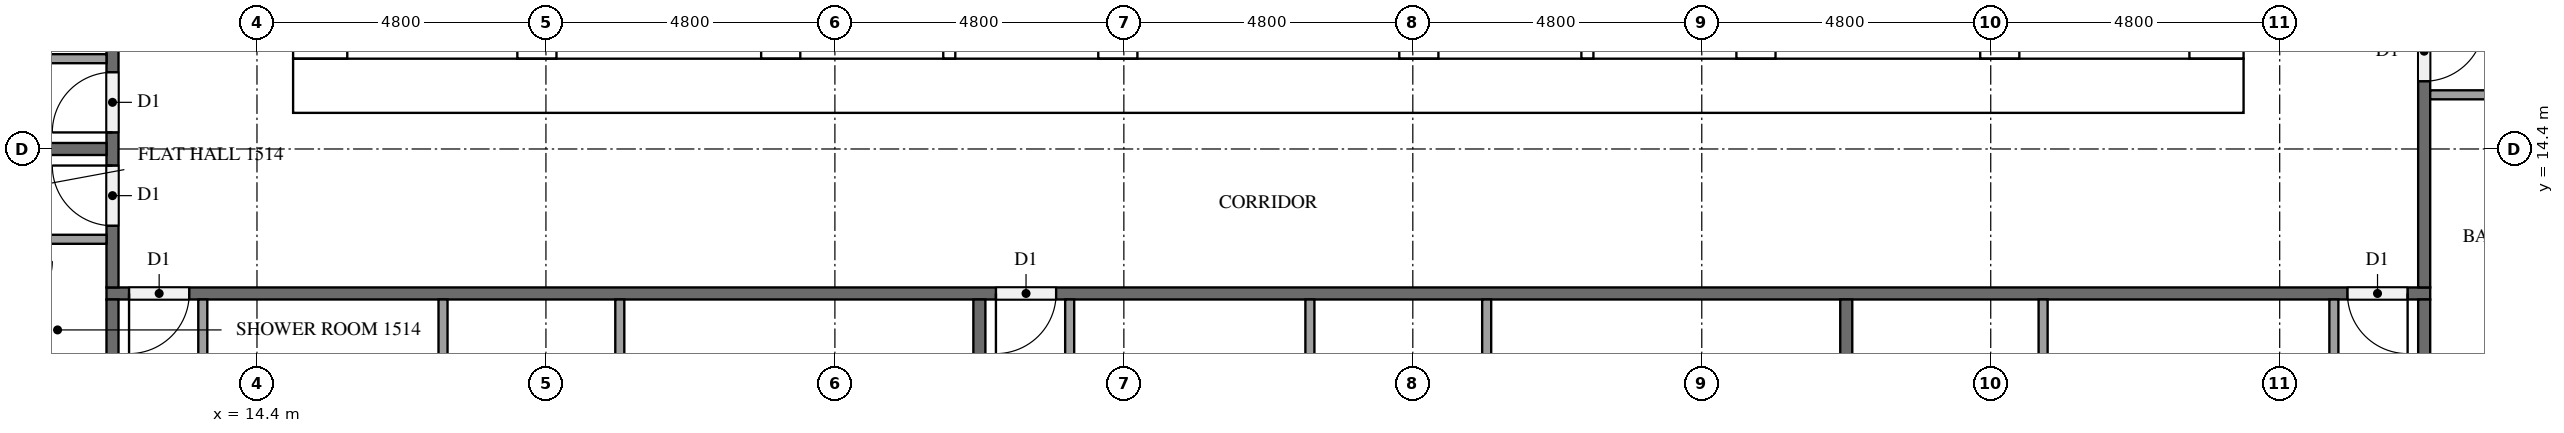
"""IFC4 building model, lengths in metres.
Left out: names, types, materials, properties, quantities, classifications, styles, units other than length and angle.
Written with IfcOpenShell. Run it as: python <this file> out.ifc"""

import sys

from ifc_helpers import new_model, si_unit, direction, frame, frame_2d, origin, place, context, subcontext, project, spatial, rectangle, extrude, element, fill, save


model = new_model("IFC4")
c1 = context("Model", 3, precision=1e-05, world=origin(), true_north=direction((0.0, 1.0)))
c2 = subcontext(c1, "Body", "Model", "MODEL_VIEW")
j1 = project(units=[si_unit("LENGTHUNIT", "METRE"), si_unit("PLANEANGLEUNIT", "RADIAN")], contexts=[c1])
p1 = place(None, origin())
s1 = spatial("IfcSite", under=j1, at=p1, CompositionType="ELEMENT")
p2 = place(p1, origin())
s2 = spatial("IfcBuilding", under=s1, at=p2, CompositionType="ELEMENT")
p3 = place(p2, frame((0.0, 0.0, 62.8)))
s3 = spatial("IfcBuildingStorey", under=s2, at=p3, CompositionType="ELEMENT", Elevation=62.8)
p4 = place(p3, frame((15.0, 15.45, 0.0), z_axis=(0.0, 0.0, 1.0), x_axis=(1.0, 0.0, 0.0)))
e1 = element("IfcWall", 1, at=p4, inside=s3, PredefinedType="SHEAR", context=c2, shape_type="SweptSolid", body=[
    extrude(rectangle(XDim=32.4, YDim=0.9, at=frame_2d((16.2, 0.0))), origin(), (0.0, 0.0, 1.0), 3.2),
])
p5 = place(p4, frame((15.3, 0.0, 0.0)))
e2 = element("IfcOpeningElement", 2, at=p5, cuts=e1, PredefinedType="OPENING", context=c2, shape_type="SweptSolid", body=[
    extrude(rectangle(XDim=1.8, YDim=2.1, at=frame_2d((0.9, 1.05))), frame((0.0, 0.46, 0.0), z_axis=(0.0, -1.0, 0.0), x_axis=(1.0, 0.0, 0.0)), (0.0, 0.0, 1.0), 0.92),
])
p6 = place(p3, frame((15.45, 15.9, 0.0), z_axis=(0.0, 0.0, 1.0), x_axis=(0.0, 1.0, 0.0)))
e3 = element("IfcWall", 3, at=p6, inside=s3, PredefinedType="SHEAR", context=c2, shape_type="SweptSolid", body=[
    extrude(rectangle(XDim=21.0, YDim=0.9, at=frame_2d((10.5, 0.0))), origin(), (0.0, 0.0, 1.0), 3.2),
])
p7 = place(p6, frame((4.86, 0.0, 0.0)))
e4 = element("IfcOpeningElement", 4, at=p7, cuts=e3, PredefinedType="OPENING", context=c2, shape_type="SweptSolid", body=[
    extrude(rectangle(XDim=1.2, YDim=2.1, at=frame_2d((0.6, 1.05))), frame((0.0, 0.46, 0.0), z_axis=(0.0, -1.0, 0.0), x_axis=(1.0, 0.0, 0.0)), (0.0, 0.0, 1.0), 0.92),
])
p8 = place(p3, frame((46.95, 15.9, 0.0), z_axis=(0.0, 0.0, 1.0), x_axis=(0.0, 1.0, 0.0)))
e5 = element("IfcWall", 5, at=p8, inside=s3, PredefinedType="SHEAR", context=c2, shape_type="SweptSolid", body=[
    extrude(rectangle(XDim=21.0, YDim=0.9, at=frame_2d((10.5, 0.0))), origin(), (0.0, 0.0, 1.0), 3.2),
])
p9 = place(p8, frame((10.2, 0.0, 0.0)))
e6 = element("IfcOpeningElement", 6, at=p9, cuts=e5, PredefinedType="OPENING", context=c2, shape_type="SweptSolid", body=[
    extrude(rectangle(XDim=1.2, YDim=2.1, at=frame_2d((0.6, 1.05))), frame((0.0, 0.46, 0.0), z_axis=(0.0, -1.0, 0.0), x_axis=(1.0, 0.0, 0.0)), (0.0, 0.0, 1.0), 0.92),
])
p10 = place(p3, frame((19.05, 15.9, 0.0), z_axis=(0.0, 0.0, 1.0), x_axis=(0.0, 1.0, 0.0)))
e7 = element("IfcWall", 7, at=p10, inside=s3, PredefinedType="SHEAR", context=c2, shape_type="SweptSolid", body=[
    extrude(rectangle(XDim=15.025, YDim=0.65, at=frame_2d((7.513, 0.0))), origin(), (0.0, 0.0, 1.0), 3.2),
])
p11 = place(p10, frame((9.55, 0.0, 0.0)))
e8 = element("IfcOpeningElement", 8, at=p11, cuts=e7, PredefinedType="OPENING", context=c2, shape_type="SweptSolid", body=[
    extrude(rectangle(XDim=1.1, YDim=2.1, at=frame_2d((0.55, 1.05))), frame((0.0, 0.335, 0.0), z_axis=(0.0, -1.0, 0.0), x_axis=(1.0, 0.0, 0.0)), (0.0, 0.0, 1.0), 0.67),
])
p12 = place(p10, frame((13.05, 0.0, 0.0)))
e9 = element("IfcOpeningElement", 9, at=p12, cuts=e7, PredefinedType="OPENING", context=c2, shape_type="SweptSolid", body=[
    extrude(rectangle(XDim=1.1, YDim=2.1, at=frame_2d((0.55, 1.05))), frame((0.0, 0.335, 0.0), z_axis=(0.0, -1.0, 0.0), x_axis=(1.0, 0.0, 0.0)), (0.0, 0.0, 1.0), 0.67),
])
p13 = place(p10, frame((0.3, 0.0, 0.0)))
e10 = element("IfcOpeningElement", 10, at=p13, cuts=e7, PredefinedType="OPENING", context=c2, shape_type="SweptSolid", body=[
    extrude(rectangle(XDim=1.2, YDim=2.1, at=frame_2d((0.6, 1.05))), frame((0.0, 0.335, 0.0), z_axis=(0.0, -1.0, 0.0), x_axis=(1.0, 0.0, 0.0)), (0.0, 0.0, 1.0), 0.67),
])
p14 = place(p3, frame((23.1, 15.9, 0.0), z_axis=(0.0, 0.0, 1.0), x_axis=(0.0, 1.0, 0.0)))
e11 = element("IfcWall", 11, at=p14, inside=s3, PredefinedType="SHEAR", context=c2, shape_type="SweptSolid", body=[
    extrude(rectangle(XDim=21.0, YDim=0.65, at=frame_2d((10.5, 0.0))), origin(), (0.0, 0.0, 1.0), 3.2),
])
p15 = place(p3, frame((39.3, 15.9, 0.0), z_axis=(0.0, 0.0, 1.0), x_axis=(0.0, 1.0, 0.0)))
e12 = element("IfcWall", 12, at=p15, inside=s3, PredefinedType="SHEAR", context=c2, shape_type="SweptSolid", body=[
    extrude(rectangle(XDim=8.35, YDim=0.65, at=frame_2d((4.175, 0.0))), origin(), (0.0, 0.0, 1.0), 3.2),
])
p16 = place(p3, frame((43.35, 15.9, 0.0), z_axis=(0.0, 0.0, 1.0), x_axis=(0.0, 1.0, 0.0)))
e13 = element("IfcWall", 13, at=p16, inside=s3, PredefinedType="SHEAR", context=c2, shape_type="SweptSolid", body=[
    extrude(rectangle(XDim=8.35, YDim=0.65, at=frame_2d((4.175, 0.0))), origin(), (0.0, 0.0, 1.0), 3.2),
])
p17 = place(p16, frame((0.3, 0.0, 0.0)))
e14 = element("IfcOpeningElement", 14, at=p17, cuts=e13, PredefinedType="OPENING", context=c2, shape_type="SweptSolid", body=[
    extrude(rectangle(XDim=1.2, YDim=2.1, at=frame_2d((0.6, 1.05))), frame((0.0, 0.335, 0.0), z_axis=(0.0, -1.0, 0.0), x_axis=(1.0, 0.0, 0.0)), (0.0, 0.0, 1.0), 0.67),
])
for number, where, z_axis, x_axis in (
    (15, (28.7, 15.9, 0.0), (0.0, 0.0, 1.0), (0.0, 1.0, 0.0)),
    (16, (33.7, 15.9, 0.0), (0.0, 0.0, 1.0), (0.0, 1.0, 0.0)),
):
    element("IfcWall", number, at=place(p3, frame(where, z_axis=z_axis, x_axis=x_axis)), inside=s3, PredefinedType="SHEAR", context=c2, shape_type="SweptSolid", body=[
        extrude(rectangle(XDim=2.525, YDim=0.65, at=frame_2d((1.263, 0.0))), origin(), (0.0, 0.0, 1.0), 3.2),
    ])
for number, where, z_axis, x_axis in (
    (17, (25.9, 15.9, 0.0), (0.0, 0.0, 1.0), (0.0, 1.0, 0.0)),
    (18, (36.5, 15.9, 0.0), (0.0, 0.0, 1.0), (0.0, 1.0, 0.0)),
):
    element("IfcWall", number, at=place(p3, frame(where, z_axis=z_axis, x_axis=x_axis)), inside=s3, PredefinedType="SOLIDWALL", context=c2, shape_type="SweptSolid", body=[
        extrude(rectangle(XDim=2.525, YDim=0.2, at=frame_2d((1.263, 0.0))), origin(), (0.0, 0.0, 1.0), 3.2),
    ])
p18 = place(p3, frame((50.5, 12.0, 0.0), z_axis=(0.0, 0.0, 1.0), x_axis=(-1.0, 0.0, 0.0)))
e19 = element("IfcWall", 19, at=p18, inside=s3, PredefinedType="PARTITIONING", context=c2, shape_type="SweptSolid", body=[
    extrude(rectangle(XDim=38.6, YDim=0.2, at=frame_2d((19.3, 0.0))), origin(), (0.0, 0.0, 1.0), 3.2),
])
p19 = place(p18, frame((37.225, 0.0, 0.0)))
e20 = element("IfcOpeningElement", 20, at=p19, cuts=e19, PredefinedType="OPENING", context=c2, shape_type="SweptSolid", body=[
    extrude(rectangle(XDim=1.0, YDim=2.1, at=frame_2d((0.5, 1.05))), frame((0.0, 0.11, 0.0), z_axis=(0.0, -1.0, 0.0), x_axis=(1.0, 0.0, 0.0)), (0.0, 0.0, 1.0), 0.22),
])
p20 = place(p18, frame((22.825, 0.0, 0.0)))
e21 = element("IfcOpeningElement", 21, at=p20, cuts=e19, PredefinedType="OPENING", context=c2, shape_type="SweptSolid", body=[
    extrude(rectangle(XDim=1.0, YDim=2.1, at=frame_2d((0.5, 1.05))), frame((0.0, 0.11, 0.0), z_axis=(0.0, -1.0, 0.0), x_axis=(1.0, 0.0, 0.0)), (0.0, 0.0, 1.0), 0.22),
])
p21 = place(p18, frame((0.375, 0.0, 0.0)))
e22 = element("IfcOpeningElement", 22, at=p21, cuts=e19, PredefinedType="OPENING", context=c2, shape_type="SweptSolid", body=[
    extrude(rectangle(XDim=1.0, YDim=2.1, at=frame_2d((0.5, 1.05))), frame((0.0, 0.11, 0.0), z_axis=(0.0, -1.0, 0.0), x_axis=(1.0, 0.0, 0.0)), (0.0, 0.0, 1.0), 0.22),
])
p22 = place(p3, frame((50.4, 40.7, 0.0), z_axis=(0.0, 0.0, 1.0), x_axis=(0.0, -1.0, 0.0)))
e23 = element("IfcWall", 23, at=p22, inside=s3, PredefinedType="PARTITIONING", context=c2, shape_type="SweptSolid", body=[
    extrude(rectangle(XDim=28.6, YDim=0.2, at=frame_2d((14.3, 0.0))), origin(), (0.0, 0.0, 1.0), 3.2),
])
p23 = place(p22, frame((24.175, 0.0, 0.0)))
e24 = element("IfcOpeningElement", 24, at=p23, cuts=e23, PredefinedType="OPENING", context=c2, shape_type="SweptSolid", body=[
    extrude(rectangle(XDim=1.0, YDim=2.1, at=frame_2d((0.5, 1.05))), frame((0.0, 0.11, 0.0), z_axis=(0.0, -1.0, 0.0), x_axis=(1.0, 0.0, 0.0)), (0.0, 0.0, 1.0), 0.22),
])
p24 = place(p22, frame((22.625, 0.0, 0.0)))
e25 = element("IfcOpeningElement", 25, at=p24, cuts=e23, PredefinedType="OPENING", context=c2, shape_type="SweptSolid", body=[
    extrude(rectangle(XDim=1.0, YDim=2.1, at=frame_2d((0.5, 1.05))), frame((0.0, 0.11, 0.0), z_axis=(0.0, -1.0, 0.0), x_axis=(1.0, 0.0, 0.0)), (0.0, 0.0, 1.0), 0.22),
])
p25 = place(p22, frame((10.625, 0.0, 0.0)))
e26 = element("IfcOpeningElement", 26, at=p25, cuts=e23, PredefinedType="OPENING", context=c2, shape_type="SweptSolid", body=[
    extrude(rectangle(XDim=1.0, YDim=2.1, at=frame_2d((0.5, 1.05))), frame((0.0, 0.11, 0.0), z_axis=(0.0, -1.0, 0.0), x_axis=(1.0, 0.0, 0.0)), (0.0, 0.0, 1.0), 0.22),
])
p26 = place(p3, frame((12.0, 12.1, 0.0), z_axis=(0.0, 0.0, 1.0), x_axis=(0.0, 1.0, 0.0)))
e27 = element("IfcWall", 27, at=p26, inside=s3, PredefinedType="PARTITIONING", context=c2, shape_type="SweptSolid", body=[
    extrude(rectangle(XDim=28.6, YDim=0.2, at=frame_2d((14.3, 0.0))), origin(), (0.0, 0.0, 1.0), 3.2),
])
p27 = place(p26, frame((19.375, 0.0, 0.0)))
e28 = element("IfcOpeningElement", 28, at=p27, cuts=e27, PredefinedType="OPENING", context=c2, shape_type="SweptSolid", body=[
    extrude(rectangle(XDim=1.0, YDim=2.1, at=frame_2d((0.5, 1.05))), frame((0.0, 0.11, 0.0), z_axis=(0.0, -1.0, 0.0), x_axis=(1.0, 0.0, 0.0)), (0.0, 0.0, 1.0), 0.22),
])
p28 = place(p26, frame((12.175, 0.0, 0.0)))
e29 = element("IfcOpeningElement", 29, at=p28, cuts=e27, PredefinedType="OPENING", context=c2, shape_type="SweptSolid", body=[
    extrude(rectangle(XDim=1.0, YDim=2.1, at=frame_2d((0.5, 1.05))), frame((0.0, 0.11, 0.0), z_axis=(0.0, -1.0, 0.0), x_axis=(1.0, 0.0, 0.0)), (0.0, 0.0, 1.0), 0.22),
])
p29 = place(p26, frame((2.575, 0.0, 0.0)))
e30 = element("IfcOpeningElement", 30, at=p29, cuts=e27, PredefinedType="OPENING", context=c2, shape_type="SweptSolid", body=[
    extrude(rectangle(XDim=1.0, YDim=2.1, at=frame_2d((0.5, 1.05))), frame((0.0, 0.11, 0.0), z_axis=(0.0, -1.0, 0.0), x_axis=(1.0, 0.0, 0.0)), (0.0, 0.0, 1.0), 0.22),
])
p30 = place(p26, frame((1.025, 0.0, 0.0)))
e31 = element("IfcOpeningElement", 31, at=p30, cuts=e27, PredefinedType="OPENING", context=c2, shape_type="SweptSolid", body=[
    extrude(rectangle(XDim=1.0, YDim=2.1, at=frame_2d((0.5, 1.05))), frame((0.0, 0.11, 0.0), z_axis=(0.0, -1.0, 0.0), x_axis=(1.0, 0.0, 0.0)), (0.0, 0.0, 1.0), 0.22),
])
for number, where, z_axis, x_axis in (
    (32, (26.4, 11.9, 0.0), (0.0, 0.0, 1.0), (0.0, -1.0, 0.0)),
    (33, (12.0, 0.1, 0.0), (0.0, 0.0, 1.0), (0.0, 1.0, 0.0)),
    (34, (40.8, 11.9, 0.0), (0.0, 0.0, 1.0), (0.0, -1.0, 0.0)),
    (35, (50.4, 11.9, 0.0), (0.0, 0.0, 1.0), (0.0, -1.0, 0.0)),
):
    element("IfcWall", number, at=place(p3, frame(where, z_axis=z_axis, x_axis=x_axis)), inside=s3, PredefinedType="PARTITIONING", context=c2, shape_type="SweptSolid", body=[
        extrude(rectangle(XDim=11.8, YDim=0.2, at=frame_2d((5.9, 0.0))), origin(), (0.0, 0.0, 1.0), 3.2),
    ])
p31 = place(p3, frame((5.225, 14.4, 0.0), z_axis=(0.0, 0.0, 1.0), x_axis=(1.0, 0.0, 0.0)))
e36 = element("IfcWall", 36, at=p31, inside=s3, PredefinedType="PARTITIONING", context=c2, shape_type="SweptSolid", body=[
    extrude(rectangle(XDim=6.675, YDim=0.2, at=frame_2d((3.337, 0.0))), origin(), (0.0, 0.0, 1.0), 3.2),
])
for number, where, z_axis, x_axis in (
    (37, (17.49, 11.9, 0.0), (0.0, 0.0, 1.0), (0.0, -1.0, 0.0)),
    (38, (20.427, 11.9, 0.0), (0.0, 0.0, 1.0), (0.0, -1.0, 0.0)),
):
    element("IfcWall", number, at=place(p3, frame(where, z_axis=z_axis, x_axis=x_axis)), inside=s3, PredefinedType="PARTITIONING", context=c2, shape_type="SweptSolid", body=[
        extrude(rectangle(XDim=4.325, YDim=0.15, at=frame_2d((2.163, 0.0))), origin(), (0.0, 0.0, 1.0), 3.2),
    ])
p32 = place(p3, frame((13.5, 11.9, 0.0), z_axis=(0.0, 0.0, 1.0), x_axis=(0.0, -1.0, 0.0)))
e39 = element("IfcWall", 39, at=p32, inside=s3, PredefinedType="PARTITIONING", context=c2, shape_type="SweptSolid", body=[
    extrude(rectangle(XDim=4.475, YDim=0.15, at=frame_2d((2.237, 0.0))), origin(), (0.0, 0.0, 1.0), 3.2),
])
for number, where, z_axis, x_axis in (
    (40, (31.89, 11.9, 0.0), (0.0, 0.0, 1.0), (0.0, -1.0, 0.0)),
    (41, (34.827, 11.9, 0.0), (0.0, 0.0, 1.0), (0.0, -1.0, 0.0)),
):
    element("IfcWall", number, at=place(p3, frame(where, z_axis=z_axis, x_axis=x_axis)), inside=s3, PredefinedType="PARTITIONING", context=c2, shape_type="SweptSolid", body=[
        extrude(rectangle(XDim=3.125, YDim=0.15, at=frame_2d((1.562, 0.0))), origin(), (0.0, 0.0, 1.0), 3.2),
    ])
p33 = place(p3, frame((27.9, 11.9, 0.0), z_axis=(0.0, 0.0, 1.0), x_axis=(0.0, -1.0, 0.0)))
e42 = element("IfcWall", 42, at=p33, inside=s3, PredefinedType="PARTITIONING", context=c2, shape_type="SweptSolid", body=[
    extrude(rectangle(XDim=3.275, YDim=0.15, at=frame_2d((1.637, 0.0))), origin(), (0.0, 0.0, 1.0), 3.2),
])
p34 = place(p3, frame((44.07, 11.9, 0.0), z_axis=(0.0, 0.0, 1.0), x_axis=(0.0, -1.0, 0.0)))
e43 = element("IfcWall", 43, at=p34, inside=s3, PredefinedType="PARTITIONING", context=c2, shape_type="SweptSolid", body=[
    extrude(rectangle(XDim=3.575, YDim=0.15, at=frame_2d((1.788, 0.0))), origin(), (0.0, 0.0, 1.0), 3.2),
])
p35 = place(p3, frame((48.9, 11.9, 0.0), z_axis=(0.0, 0.0, 1.0), x_axis=(0.0, -1.0, 0.0)))
e44 = element("IfcWall", 44, at=p35, inside=s3, PredefinedType="PARTITIONING", context=c2, shape_type="SweptSolid", body=[
    extrude(rectangle(XDim=3.725, YDim=0.15, at=frame_2d((1.862, 0.0))), origin(), (0.0, 0.0, 1.0), 3.2),
])
p36 = place(p3, frame((50.5, 15.3, 0.0), z_axis=(0.0, 0.0, 1.0), x_axis=(1.0, 0.0, 0.0)))
e45 = element("IfcWall", 45, at=p36, inside=s3, PredefinedType="PARTITIONING", context=c2, shape_type="SweptSolid", body=[
    extrude(rectangle(XDim=3.725, YDim=0.15, at=frame_2d((1.863, 0.0))), origin(), (0.0, 0.0, 1.0), 3.2),
])
p37 = place(p3, frame((11.9, 15.9, 0.0), z_axis=(0.0, 0.0, 1.0), x_axis=(-1.0, 0.0, 0.0)))
e46 = element("IfcWall", 46, at=p37, inside=s3, PredefinedType="PARTITIONING", context=c2, shape_type="SweptSolid", body=[
    extrude(rectangle(XDim=1.925, YDim=0.15, at=frame_2d((0.962, 0.0))), origin(), (0.0, 0.0, 1.0), 3.2),
])
p38 = place(p3, frame((11.9, 12.9, 0.0), z_axis=(0.0, 0.0, 1.0), x_axis=(-1.0, 0.0, 0.0)))
e47 = element("IfcWall", 47, at=p38, inside=s3, PredefinedType="PARTITIONING", context=c2, shape_type="SweptSolid", body=[
    extrude(rectangle(XDim=1.775, YDim=0.15, at=frame_2d((0.887, 0.0))), origin(), (0.0, 0.0, 1.0), 3.2),
])
p39 = place(p5, frame((1.8, 0.0, 0.0), z_axis=(0.0, 0.0, 1.0), x_axis=(-1.0, 0.0, 0.0)))
e48 = element("IfcDoor", 48, at=p39, inside=s3, OperationType="DOUBLE_DOOR_SINGLE_SWING", PredefinedType="DOOR", context=c2, shape_type="SweptSolid", body=[
    extrude(rectangle(XDim=1.8, YDim=2.1, at=frame_2d((0.9, 1.05))), frame((0.0, 0.025, 0.0), z_axis=(0.0, -1.0, 0.0), x_axis=(1.0, 0.0, 0.0)), (0.0, 0.0, 1.0), 0.05),
])
fill(e2, e48)
p40 = place(p19, origin())
e49 = element("IfcDoor", 49, at=p40, inside=s3, OperationType="SINGLE_SWING_RIGHT", PredefinedType="DOOR", context=c2, shape_type="SweptSolid", body=[
    extrude(rectangle(XDim=1.0, YDim=2.1, at=frame_2d((0.5, 1.05))), frame((0.0, 0.025, 0.0), z_axis=(0.0, -1.0, 0.0), x_axis=(1.0, 0.0, 0.0)), (0.0, 0.0, 1.0), 0.05),
])
fill(e20, e49)
p41 = place(p20, origin())
e50 = element("IfcDoor", 50, at=p41, inside=s3, OperationType="SINGLE_SWING_RIGHT", PredefinedType="DOOR", context=c2, shape_type="SweptSolid", body=[
    extrude(rectangle(XDim=1.0, YDim=2.1, at=frame_2d((0.5, 1.05))), frame((0.0, 0.025, 0.0), z_axis=(0.0, -1.0, 0.0), x_axis=(1.0, 0.0, 0.0)), (0.0, 0.0, 1.0), 0.05),
])
fill(e21, e50)
p42 = place(p21, origin())
e51 = element("IfcDoor", 51, at=p42, inside=s3, OperationType="SINGLE_SWING_LEFT", PredefinedType="DOOR", context=c2, shape_type="SweptSolid", body=[
    extrude(rectangle(XDim=1.0, YDim=2.1, at=frame_2d((0.5, 1.05))), frame((0.0, 0.025, 0.0), z_axis=(0.0, -1.0, 0.0), x_axis=(1.0, 0.0, 0.0)), (0.0, 0.0, 1.0), 0.05),
])
fill(e22, e51)
p43 = place(p23, origin())
e52 = element("IfcDoor", 52, at=p43, inside=s3, OperationType="SINGLE_SWING_LEFT", PredefinedType="DOOR", context=c2, shape_type="SweptSolid", body=[
    extrude(rectangle(XDim=1.0, YDim=2.1, at=frame_2d((0.5, 1.05))), frame((0.0, 0.025, 0.0), z_axis=(0.0, -1.0, 0.0), x_axis=(1.0, 0.0, 0.0)), (0.0, 0.0, 1.0), 0.05),
])
fill(e24, e52)
p44 = place(p29, origin())
e53 = element("IfcDoor", 53, at=p44, inside=s3, OperationType="SINGLE_SWING_LEFT", PredefinedType="DOOR", context=c2, shape_type="SweptSolid", body=[
    extrude(rectangle(XDim=1.0, YDim=2.1, at=frame_2d((0.5, 1.05))), frame((0.0, 0.025, 0.0), z_axis=(0.0, -1.0, 0.0), x_axis=(1.0, 0.0, 0.0)), (0.0, 0.0, 1.0), 0.05),
])
fill(e30, e53)
p45 = place(p30, origin())
e54 = element("IfcDoor", 54, at=p45, inside=s3, OperationType="SINGLE_SWING_RIGHT", PredefinedType="DOOR", context=c2, shape_type="SweptSolid", body=[
    extrude(rectangle(XDim=1.0, YDim=2.1, at=frame_2d((0.5, 1.05))), frame((0.0, 0.025, 0.0), z_axis=(0.0, -1.0, 0.0), x_axis=(1.0, 0.0, 0.0)), (0.0, 0.0, 1.0), 0.05),
])
fill(e31, e54)
save(model, sys.argv[1])
